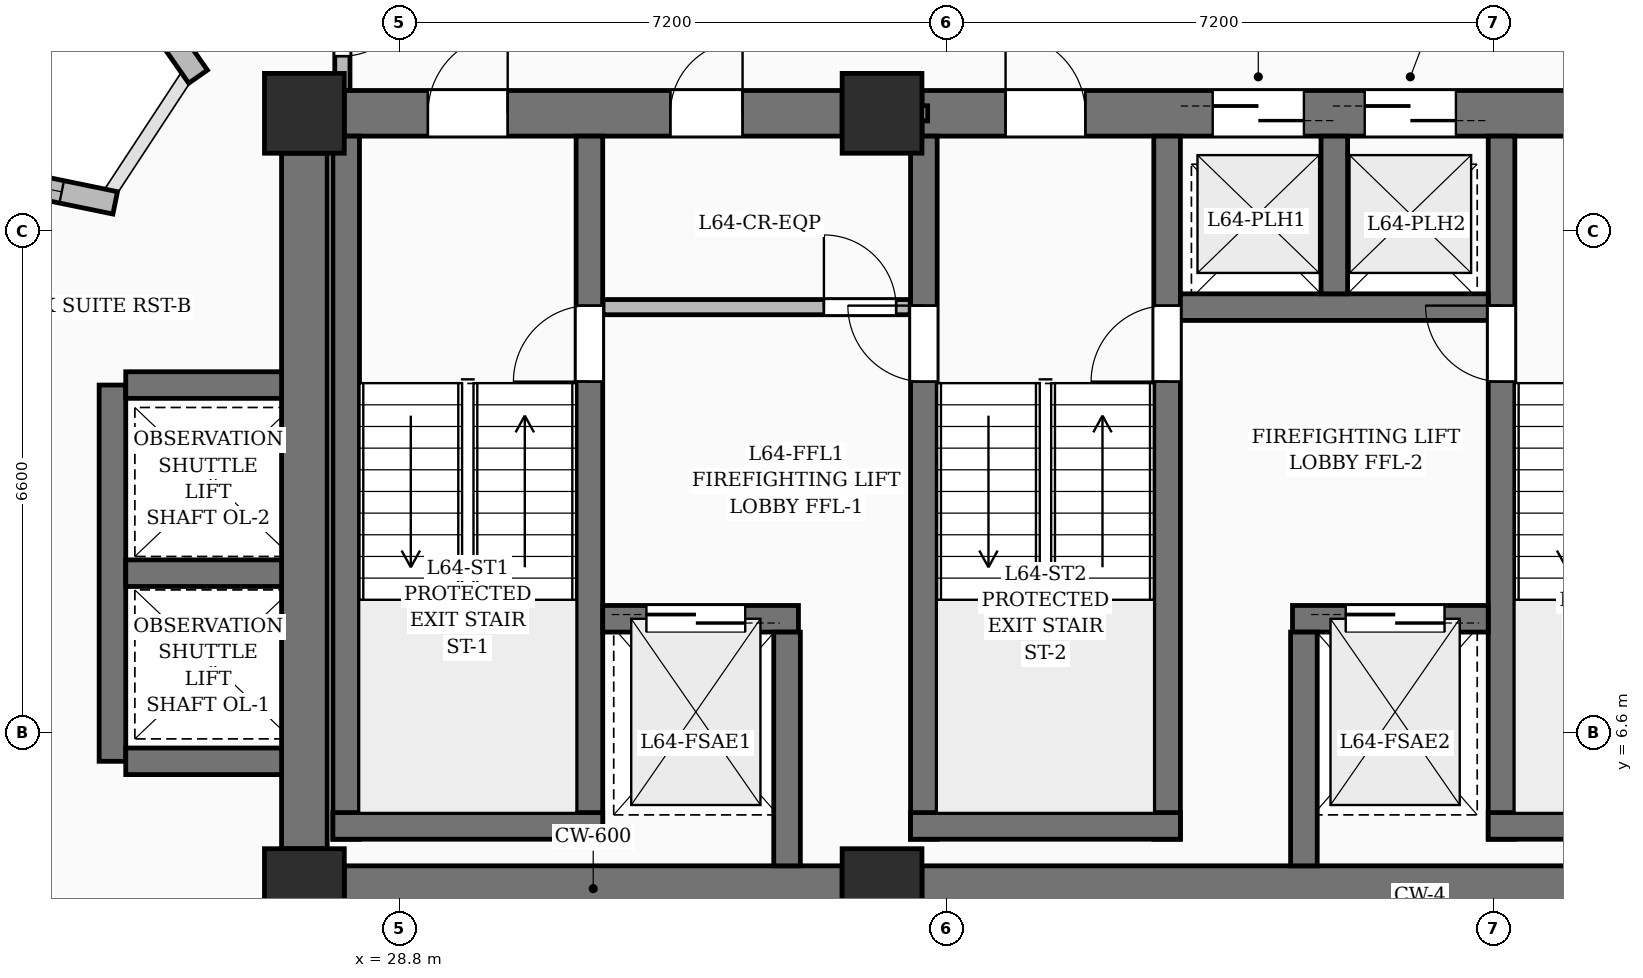
"""IFC4 building model, lengths in metres.
Left out: names, types, materials, properties, quantities, classifications, styles, units other than length and angle.
Written with IfcOpenShell. Run it as: python <this file> out.ifc"""

import sys

from ifc_helpers import new_model, si_unit, direction, frame, frame_2d, origin, origin_2d, place, context, subcontext, project, spatial, rectangle, extrude, element, fill, save


model = new_model("IFC4")
c1 = context("Model", 3, precision=1e-05, world=origin(), true_north=direction((0.0, 1.0)))
c2 = subcontext(c1, "Body", "Model", "MODEL_VIEW")
j1 = project(units=[si_unit("LENGTHUNIT", "METRE"), si_unit("PLANEANGLEUNIT", "RADIAN")], contexts=[c1])
p1 = place(None, origin())
s1 = spatial("IfcSite", under=j1, at=p1, CompositionType="ELEMENT")
p2 = place(p1, origin())
s2 = spatial("IfcBuilding", under=s1, at=p2, CompositionType="ELEMENT")
p3 = place(p2, frame((0.0, 0.0, 248.25)))
s3 = spatial("IfcBuildingStorey", under=s2, at=p3, CompositionType="ELEMENT", Elevation=248.25)
for number, where, z_axis, x_axis in (
    (1, (27.55, 4.55, 0.0), (0.0, 0.0, 1.0), (1.0, 0.0, 0.0)),
    (2, (35.15, 4.55, 0.0), (0.0, 0.0, 1.0), (1.0, 0.0, 0.0)),
    (3, (27.55, 14.75, 0.0), (0.0, 0.0, 1.0), (1.0, 0.0, 0.0)),
    (4, (35.15, 14.75, 0.0), (0.0, 0.0, 1.0), (1.0, 0.0, 0.0)),
):
    element("IfcColumn", number, at=place(p3, frame(where, z_axis=z_axis, x_axis=x_axis)), inside=s3, PredefinedType="COLUMN", context=c2, shape_type="SweptSolid", body=[
        extrude(rectangle(XDim=1.05, YDim=1.05, at=origin_2d()), origin(), (0.0, 0.0, 1.0), 3.75),
    ])
p4 = place(p3, frame((28.075, 4.55, 0.0), z_axis=(0.0, 0.0, 1.0), x_axis=(1.0, 0.0, 0.0)))
e5 = element("IfcWall", 5, at=p4, inside=s3, PredefinedType="SHEAR", context=c2, shape_type="SweptSolid", body=[
    extrude(rectangle(XDim=6.55, YDim=0.6, at=frame_2d((3.275, 0.0))), origin(), (0.0, 0.0, 1.0), 3.75),
])
p5 = place(p3, frame((35.675, 4.55, 0.0), z_axis=(0.0, 0.0, 1.0), x_axis=(1.0, 0.0, 0.0)))
e6 = element("IfcWall", 6, at=p5, inside=s3, PredefinedType="SHEAR", context=c2, shape_type="SweptSolid", body=[
    extrude(rectangle(XDim=10.85, YDim=0.6, at=frame_2d((5.425, 0.0))), origin(), (0.0, 0.0, 1.0), 3.75),
])
p6 = place(p3, frame((28.075, 14.75, 0.0), z_axis=(0.0, 0.0, 1.0), x_axis=(1.0, 0.0, 0.0)))
e7 = element("IfcWall", 7, at=p6, inside=s3, PredefinedType="SHEAR", context=c2, shape_type="SweptSolid", body=[
    extrude(rectangle(XDim=6.55, YDim=0.6, at=frame_2d((3.275, 0.0))), origin(), (0.0, 0.0, 1.0), 3.75),
])
p7 = place(p6, frame((1.1, 0.0, 0.0)))
e8 = element("IfcOpeningElement", 8, at=p7, cuts=e7, PredefinedType="OPENING", context=c2, shape_type="SweptSolid", body=[
    extrude(rectangle(XDim=1.05, YDim=2.15, at=frame_2d((0.525, 1.075))), frame((0.0, 0.31, 0.0), z_axis=(0.0, -1.0, 0.0), x_axis=(1.0, 0.0, 0.0)), (0.0, 0.0, 1.0), 0.62),
])
p8 = place(p6, frame((4.29, 0.0, 0.0)))
e9 = element("IfcOpeningElement", 9, at=p8, cuts=e7, PredefinedType="OPENING", context=c2, shape_type="SweptSolid", body=[
    extrude(rectangle(XDim=0.95, YDim=2.15, at=frame_2d((0.475, 1.075))), frame((0.0, 0.31, 0.0), z_axis=(0.0, -1.0, 0.0), x_axis=(1.0, 0.0, 0.0)), (0.0, 0.0, 1.0), 0.62),
])
p9 = place(p3, frame((35.675, 14.75, 0.0), z_axis=(0.0, 0.0, 1.0), x_axis=(1.0, 0.0, 0.0)))
e10 = element("IfcWall", 10, at=p9, inside=s3, PredefinedType="SHEAR", context=c2, shape_type="SweptSolid", body=[
    extrude(rectangle(XDim=10.85, YDim=0.6, at=frame_2d((5.425, 0.0))), origin(), (0.0, 0.0, 1.0), 3.75),
])
p10 = place(p9, frame((1.1, 0.0, 0.0)))
e11 = element("IfcOpeningElement", 11, at=p10, cuts=e10, PredefinedType="OPENING", context=c2, shape_type="SweptSolid", body=[
    extrude(rectangle(XDim=1.05, YDim=2.15, at=frame_2d((0.525, 1.075))), frame((0.0, 0.31, 0.0), z_axis=(0.0, -1.0, 0.0), x_axis=(1.0, 0.0, 0.0)), (0.0, 0.0, 1.0), 0.62),
])
p11 = place(p9, frame((8.7, 0.0, 0.0)))
e12 = element("IfcOpeningElement", 12, at=p11, cuts=e10, PredefinedType="OPENING", context=c2, shape_type="SweptSolid", body=[
    extrude(rectangle(XDim=1.05, YDim=2.15, at=frame_2d((0.525, 1.075))), frame((0.0, 0.31, 0.0), z_axis=(0.0, -1.0, 0.0), x_axis=(1.0, 0.0, 0.0)), (0.0, 0.0, 1.0), 0.62),
])
p12 = place(p9, frame((3.825, 0.0, 0.0)))
e13 = element("IfcOpeningElement", 13, at=p12, cuts=e10, PredefinedType="OPENING", context=c2, shape_type="SweptSolid", body=[
    extrude(rectangle(XDim=1.2, YDim=2.2, at=frame_2d((0.6, 1.1))), frame((0.0, 0.31, 0.0), z_axis=(0.0, -1.0, 0.0), x_axis=(1.0, 0.0, 0.0)), (0.0, 0.0, 1.0), 0.62),
])
p13 = place(p9, frame((5.825, 0.0, 0.0)))
e14 = element("IfcOpeningElement", 14, at=p13, cuts=e10, PredefinedType="OPENING", context=c2, shape_type="SweptSolid", body=[
    extrude(rectangle(XDim=1.2, YDim=2.2, at=frame_2d((0.6, 1.1))), frame((0.0, 0.31, 0.0), z_axis=(0.0, -1.0, 0.0), x_axis=(1.0, 0.0, 0.0)), (0.0, 0.0, 1.0), 0.62),
])
p14 = place(p3, frame((27.55, 5.075, 0.0), z_axis=(0.0, 0.0, 1.0), x_axis=(0.0, 1.0, 0.0)))
e15 = element("IfcWall", 15, at=p14, inside=s3, PredefinedType="SHEAR", context=c2, shape_type="SweptSolid", body=[
    extrude(rectangle(XDim=9.15, YDim=0.6, at=frame_2d((4.575, 0.0))), origin(), (0.0, 0.0, 1.0), 3.75),
])
p15 = place(p3, frame((28.1, 5.2, 0.0), z_axis=(0.0, 0.0, 1.0), x_axis=(0.0, 1.0, 0.0)))
e16 = element("IfcWall", 16, at=p15, inside=s3, PredefinedType="SOLIDWALL", context=c2, shape_type="SweptSolid", body=[
    extrude(rectangle(XDim=9.25, YDim=0.35, at=frame_2d((4.625, 0.0))), origin(), (0.0, 0.0, 1.0), 3.75),
])
p16 = place(p3, frame((31.3, 5.2, 0.0), z_axis=(0.0, 0.0, 1.0), x_axis=(0.0, 1.0, 0.0)))
e17 = element("IfcWall", 17, at=p16, inside=s3, PredefinedType="SOLIDWALL", context=c2, shape_type="SweptSolid", body=[
    extrude(rectangle(XDim=9.25, YDim=0.35, at=frame_2d((4.625, 0.0))), origin(), (0.0, 0.0, 1.0), 3.75),
])
p17 = place(p16, frame((6.02, 0.0, 0.0)))
e18 = element("IfcOpeningElement", 18, at=p17, cuts=e17, PredefinedType="OPENING", context=c2, shape_type="SweptSolid", body=[
    extrude(rectangle(XDim=1.0, YDim=2.15, at=frame_2d((0.5, 1.075))), frame((0.0, 0.185, 0.0), z_axis=(0.0, -1.0, 0.0), x_axis=(1.0, 0.0, 0.0)), (0.0, 0.0, 1.0), 0.37),
])
p18 = place(p3, frame((27.925, 5.375, 0.0), z_axis=(0.0, 0.0, 1.0), x_axis=(1.0, 0.0, 0.0)))
e19 = element("IfcWall", 19, at=p18, inside=s3, PredefinedType="SOLIDWALL", context=c2, shape_type="SweptSolid", body=[
    extrude(rectangle(XDim=3.55, YDim=0.35, at=frame_2d((1.775, 0.0))), origin(), (0.0, 0.0, 1.0), 3.75),
])
p19 = place(p3, frame((35.7, 5.2, 0.0), z_axis=(0.0, 0.0, 1.0), x_axis=(0.0, 1.0, 0.0)))
e20 = element("IfcWall", 20, at=p19, inside=s3, PredefinedType="SOLIDWALL", context=c2, shape_type="SweptSolid", body=[
    extrude(rectangle(XDim=9.25, YDim=0.35, at=frame_2d((4.625, 0.0))), origin(), (0.0, 0.0, 1.0), 3.75),
])
p20 = place(p19, frame((6.02, 0.0, 0.0)))
e21 = element("IfcOpeningElement", 21, at=p20, cuts=e20, PredefinedType="OPENING", context=c2, shape_type="SweptSolid", body=[
    extrude(rectangle(XDim=1.0, YDim=2.15, at=frame_2d((0.5, 1.075))), frame((0.0, 0.185, 0.0), z_axis=(0.0, -1.0, 0.0), x_axis=(1.0, 0.0, 0.0)), (0.0, 0.0, 1.0), 0.37),
])
p21 = place(p3, frame((38.9, 5.2, 0.0), z_axis=(0.0, 0.0, 1.0), x_axis=(0.0, 1.0, 0.0)))
e22 = element("IfcWall", 22, at=p21, inside=s3, PredefinedType="SOLIDWALL", context=c2, shape_type="SweptSolid", body=[
    extrude(rectangle(XDim=9.25, YDim=0.35, at=frame_2d((4.625, 0.0))), origin(), (0.0, 0.0, 1.0), 3.75),
])
p22 = place(p21, frame((6.02, 0.0, 0.0)))
e23 = element("IfcOpeningElement", 23, at=p22, cuts=e22, PredefinedType="OPENING", context=c2, shape_type="SweptSolid", body=[
    extrude(rectangle(XDim=1.0, YDim=2.15, at=frame_2d((0.5, 1.075))), frame((0.0, 0.185, 0.0), z_axis=(0.0, -1.0, 0.0), x_axis=(1.0, 0.0, 0.0)), (0.0, 0.0, 1.0), 0.37),
])
p23 = place(p3, frame((35.525, 5.375, 0.0), z_axis=(0.0, 0.0, 1.0), x_axis=(1.0, 0.0, 0.0)))
e24 = element("IfcWall", 24, at=p23, inside=s3, PredefinedType="SOLIDWALL", context=c2, shape_type="SweptSolid", body=[
    extrude(rectangle(XDim=3.55, YDim=0.35, at=frame_2d((1.775, 0.0))), origin(), (0.0, 0.0, 1.0), 3.75),
])
p24 = place(p3, frame((43.3, 5.2, 0.0), z_axis=(0.0, 0.0, 1.0), x_axis=(0.0, 1.0, 0.0)))
e25 = element("IfcWall", 25, at=p24, inside=s3, PredefinedType="SOLIDWALL", context=c2, shape_type="SweptSolid", body=[
    extrude(rectangle(XDim=9.25, YDim=0.35, at=frame_2d((4.625, 0.0))), origin(), (0.0, 0.0, 1.0), 3.75),
])
p25 = place(p24, frame((6.02, 0.0, 0.0)))
e26 = element("IfcOpeningElement", 26, at=p25, cuts=e25, PredefinedType="OPENING", context=c2, shape_type="SweptSolid", body=[
    extrude(rectangle(XDim=1.0, YDim=2.15, at=frame_2d((0.5, 1.075))), frame((0.0, 0.185, 0.0), z_axis=(0.0, -1.0, 0.0), x_axis=(1.0, 0.0, 0.0)), (0.0, 0.0, 1.0), 0.37),
])
p26 = place(p3, frame((43.125, 5.375, 0.0), z_axis=(0.0, 0.0, 1.0), x_axis=(1.0, 0.0, 0.0)))
e27 = element("IfcWall", 27, at=p26, inside=s3, PredefinedType="SOLIDWALL", context=c2, shape_type="SweptSolid", body=[
    extrude(rectangle(XDim=3.55, YDim=0.35, at=frame_2d((1.775, 0.0))), origin(), (0.0, 0.0, 1.0), 3.75),
])
p27 = place(p3, frame((31.475, 8.1, 0.0), z_axis=(0.0, 0.0, 1.0), x_axis=(1.0, 0.0, 0.0)))
e28 = element("IfcWall", 28, at=p27, inside=s3, PredefinedType="SOLIDWALL", context=c2, shape_type="SweptSolid", body=[
    extrude(rectangle(XDim=2.575, YDim=0.35, at=frame_2d((1.288, 0.0))), origin(), (0.0, 0.0, 1.0), 3.75),
])
p28 = place(p27, frame((0.575, 0.0, 0.0)))
e29 = element("IfcOpeningElement", 29, at=p28, cuts=e28, PredefinedType="OPENING", context=c2, shape_type="SweptSolid", body=[
    extrude(rectangle(XDim=1.3, YDim=2.25, at=frame_2d((0.65, 1.125))), frame((0.0, 0.185, 0.0), z_axis=(0.0, -1.0, 0.0), x_axis=(1.0, 0.0, 0.0)), (0.0, 0.0, 1.0), 0.37),
])
p29 = place(p3, frame((40.55, 8.1, 0.0), z_axis=(0.0, 0.0, 1.0), x_axis=(1.0, 0.0, 0.0)))
e30 = element("IfcWall", 30, at=p29, inside=s3, PredefinedType="SOLIDWALL", context=c2, shape_type="SweptSolid", body=[
    extrude(rectangle(XDim=2.575, YDim=0.35, at=frame_2d((1.288, 0.0))), origin(), (0.0, 0.0, 1.0), 3.75),
])
p30 = place(p29, frame((0.7, 0.0, 0.0)))
e31 = element("IfcOpeningElement", 31, at=p30, cuts=e30, PredefinedType="OPENING", context=c2, shape_type="SweptSolid", body=[
    extrude(rectangle(XDim=1.3, YDim=2.25, at=frame_2d((0.65, 1.125))), frame((0.0, 0.185, 0.0), z_axis=(0.0, -1.0, 0.0), x_axis=(1.0, 0.0, 0.0)), (0.0, 0.0, 1.0), 0.37),
])
for number, where, z_axis, x_axis in (
    (32, (33.9, 4.85, 0.0), (0.0, 0.0, 1.0), (0.0, 1.0, 0.0)),
    (33, (40.7, 4.85, 0.0), (0.0, 0.0, 1.0), (0.0, 1.0, 0.0)),
):
    element("IfcWall", number, at=place(p3, frame(where, z_axis=z_axis, x_axis=x_axis)), inside=s3, PredefinedType="SOLIDWALL", context=c2, shape_type="SweptSolid", body=[
        extrude(rectangle(XDim=3.075, YDim=0.35, at=frame_2d((1.538, 0.0))), origin(), (0.0, 0.0, 1.0), 3.75),
    ])
p31 = place(p3, frame((39.075, 12.2, 0.0), z_axis=(0.0, 0.0, 1.0), x_axis=(1.0, 0.0, 0.0)))
e34 = element("IfcWall", 34, at=p31, inside=s3, PredefinedType="SOLIDWALL", context=c2, shape_type="SweptSolid", body=[
    extrude(rectangle(XDim=4.05, YDim=0.35, at=frame_2d((2.025, 0.0))), origin(), (0.0, 0.0, 1.0), 3.75),
])
p32 = place(p3, frame((41.1, 12.375, 0.0), z_axis=(0.0, 0.0, 1.0), x_axis=(0.0, 1.0, 0.0)))
e35 = element("IfcWall", 35, at=p32, inside=s3, PredefinedType="SOLIDWALL", context=c2, shape_type="SweptSolid", body=[
    extrude(rectangle(XDim=2.075, YDim=0.35, at=frame_2d((1.038, 0.0))), origin(), (0.0, 0.0, 1.0), 3.75),
])
p33 = place(p3, frame((25.025, 6.225, 0.0), z_axis=(0.0, 0.0, 1.0), x_axis=(0.0, 1.0, 0.0)))
e36 = element("IfcWall", 36, at=p33, inside=s3, PredefinedType="SOLIDWALL", context=c2, shape_type="SweptSolid", body=[
    extrude(rectangle(XDim=4.95, YDim=0.35, at=frame_2d((2.475, 0.0))), origin(), (0.0, 0.0, 1.0), 3.75),
])
for number, where, z_axis, x_axis in (
    (37, (25.2, 6.225, 0.0), (0.0, 0.0, 1.0), (1.0, 0.0, 0.0)),
    (38, (25.2, 8.7, 0.0), (0.0, 0.0, 1.0), (1.0, 0.0, 0.0)),
    (39, (25.2, 11.175, 0.0), (0.0, 0.0, 1.0), (1.0, 0.0, 0.0)),
):
    element("IfcWall", number, at=place(p3, frame(where, z_axis=z_axis, x_axis=x_axis)), inside=s3, PredefinedType="SOLIDWALL", context=c2, shape_type="SweptSolid", body=[
        extrude(rectangle(XDim=2.05, YDim=0.35, at=frame_2d((1.025, 0.0))), origin(), (0.0, 0.0, 1.0), 3.75),
    ])
p34 = place(p3, frame((22.521, 14.094, 0.0), z_axis=(0.0, 0.0, 1.0), x_axis=(0.979494216194, -0.20147228207, 0.0)))
e40 = element("IfcWall", 40, at=p34, inside=s3, PredefinedType="SOLIDWALL", context=c2, shape_type="SweptSolid", body=[
    extrude(rectangle(XDim=2.593, YDim=0.3, at=frame_2d((1.297, 0.0))), origin(), (0.0, 0.0, 1.0), 2.825),
])
p35 = place(p34, frame((0.675, 0.0, 0.8)))
e41 = element("IfcOpeningElement", 41, at=p35, cuts=e40, PredefinedType="OPENING", context=c2, shape_type="SweptSolid", body=[
    extrude(rectangle(XDim=1.2, YDim=1.8, at=frame_2d((0.6, 0.9))), frame((0.0, 0.16, 0.0), z_axis=(0.0, -1.0, 0.0), x_axis=(1.0, 0.0, 0.0)), (0.0, 0.0, 1.0), 0.32),
])
p36 = place(p3, frame((26.151, 15.232, 0.0), z_axis=(0.0, 0.0, 1.0), x_axis=(-0.573607655321, 0.819130183644, 0.0)))
e42 = element("IfcWall", 42, at=p36, inside=s3, PredefinedType="SOLIDWALL", context=c2, shape_type="SweptSolid", body=[
    extrude(rectangle(XDim=2.593, YDim=0.3, at=frame_2d((1.297, 0.0))), origin(), (0.0, 0.0, 1.0), 2.825),
])
p37 = place(p3, frame((34.72, 14.75, 0.0), z_axis=(0.0, 0.0, 1.0), x_axis=(1.0, 0.0, 0.0)))
e43 = element("IfcWall", 43, at=p37, inside=s3, PredefinedType="PARTITIONING", context=c2, shape_type="SweptSolid", body=[
    extrude(rectangle(XDim=1.03, YDim=0.2, at=frame_2d((0.515, 0.0))), origin(), (0.0, 0.0, 1.0), 2.685),
])
p38 = place(p3, frame((31.48, 12.2, 0.0), z_axis=(0.0, 0.0, 1.0), x_axis=(1.0, 0.0, 0.0)))
e44 = element("IfcWall", 44, at=p38, inside=s3, PredefinedType="PARTITIONING", context=c2, shape_type="SweptSolid", body=[
    extrude(rectangle(XDim=4.04, YDim=0.2, at=frame_2d((2.02, 0.0))), origin(), (0.0, 0.0, 1.0), 3.5),
])
p39 = place(p38, frame((2.905, 0.0, 0.0)))
e45 = element("IfcOpeningElement", 45, at=p39, cuts=e44, PredefinedType="OPENING", context=c2, shape_type="SweptSolid", body=[
    extrude(rectangle(XDim=0.95, YDim=2.15, at=frame_2d((0.475, 1.075))), frame((0.0, 0.11, 0.0), z_axis=(0.0, -1.0, 0.0), x_axis=(1.0, 0.0, 0.0)), (0.0, 0.0, 1.0), 0.22),
])
p40 = place(p3, frame((28.05, 16.75, 0.0), z_axis=(0.0, 0.0, 1.0), x_axis=(0.0, -1.0, 0.0)))
e46 = element("IfcWall", 46, at=p40, inside=s3, PredefinedType="PARTITIONING", context=c2, shape_type="SweptSolid", body=[
    extrude(rectangle(XDim=1.7, YDim=0.2, at=frame_2d((0.85, 0.0))), origin(), (0.0, 0.0, 1.0), 3.5),
])
p41 = place(p40, frame((0.348, 0.0, 0.0)))
e47 = element("IfcOpeningElement", 47, at=p41, cuts=e46, PredefinedType="OPENING", context=c2, shape_type="SweptSolid", body=[
    extrude(rectangle(XDim=0.9, YDim=2.1, at=frame_2d((0.45, 1.05))), frame((0.0, 0.11, 0.0), z_axis=(0.0, -1.0, 0.0), x_axis=(1.0, 0.0, 0.0)), (0.0, 0.0, 1.0), 0.22),
])
p42 = place(p35, origin())
e48 = element("IfcWindow", 48, at=p42, inside=s3, PartitioningType="SINGLE_PANEL", PredefinedType="WINDOW", context=c2, shape_type="SweptSolid", body=[
    extrude(rectangle(XDim=1.2, YDim=1.8, at=frame_2d((0.6, 0.9))), frame((0.0, 0.03, 0.0), z_axis=(0.0, -1.0, 0.0), x_axis=(1.0, 0.0, 0.0)), (0.0, 0.0, 1.0), 0.06),
])
fill(e41, e48)
p43 = place(p7, origin())
e49 = element("IfcDoor", 49, at=p43, inside=s3, OperationType="SINGLE_SWING_RIGHT", PredefinedType="DOOR", context=c2, shape_type="SweptSolid", body=[
    extrude(rectangle(XDim=1.05, YDim=2.15, at=frame_2d((0.525, 1.075))), frame((0.0, 0.025, 0.0), z_axis=(0.0, -1.0, 0.0), x_axis=(1.0, 0.0, 0.0)), (0.0, 0.0, 1.0), 0.05),
])
fill(e8, e49)
p44 = place(p10, origin())
e50 = element("IfcDoor", 50, at=p44, inside=s3, OperationType="SINGLE_SWING_LEFT", PredefinedType="DOOR", context=c2, shape_type="SweptSolid", body=[
    extrude(rectangle(XDim=1.05, YDim=2.15, at=frame_2d((0.525, 1.075))), frame((0.0, 0.025, 0.0), z_axis=(0.0, -1.0, 0.0), x_axis=(1.0, 0.0, 0.0)), (0.0, 0.0, 1.0), 0.05),
])
fill(e11, e50)
p45 = place(p17, origin())
e51 = element("IfcDoor", 51, at=p45, inside=s3, OperationType="SINGLE_SWING_LEFT", PredefinedType="DOOR", context=c2, shape_type="SweptSolid", body=[
    extrude(rectangle(XDim=1.0, YDim=2.15, at=frame_2d((0.5, 1.075))), frame((0.0, 0.025, 0.0), z_axis=(0.0, -1.0, 0.0), x_axis=(1.0, 0.0, 0.0)), (0.0, 0.0, 1.0), 0.05),
])
fill(e18, e51)
p46 = place(p20, origin())
e52 = element("IfcDoor", 52, at=p46, inside=s3, OperationType="SINGLE_SWING_RIGHT", PredefinedType="DOOR", context=c2, shape_type="SweptSolid", body=[
    extrude(rectangle(XDim=1.0, YDim=2.15, at=frame_2d((0.5, 1.075))), frame((0.0, 0.025, 0.0), z_axis=(0.0, -1.0, 0.0), x_axis=(1.0, 0.0, 0.0)), (0.0, 0.0, 1.0), 0.05),
])
fill(e21, e52)
p47 = place(p22, origin())
e53 = element("IfcDoor", 53, at=p47, inside=s3, OperationType="SINGLE_SWING_LEFT", PredefinedType="DOOR", context=c2, shape_type="SweptSolid", body=[
    extrude(rectangle(XDim=1.0, YDim=2.15, at=frame_2d((0.5, 1.075))), frame((0.0, 0.025, 0.0), z_axis=(0.0, -1.0, 0.0), x_axis=(1.0, 0.0, 0.0)), (0.0, 0.0, 1.0), 0.05),
])
fill(e23, e53)
p48 = place(p25, origin())
e54 = element("IfcDoor", 54, at=p48, inside=s3, OperationType="SINGLE_SWING_RIGHT", PredefinedType="DOOR", context=c2, shape_type="SweptSolid", body=[
    extrude(rectangle(XDim=1.0, YDim=2.15, at=frame_2d((0.5, 1.075))), frame((0.0, 0.025, 0.0), z_axis=(0.0, -1.0, 0.0), x_axis=(1.0, 0.0, 0.0)), (0.0, 0.0, 1.0), 0.05),
])
fill(e26, e54)
p49 = place(p28, origin())
e55 = element("IfcDoor", 55, at=p49, inside=s3, OperationType="DOUBLE_DOOR_SLIDING", PredefinedType="DOOR", context=c2, shape_type="SweptSolid", body=[
    extrude(rectangle(XDim=1.3, YDim=2.25, at=frame_2d((0.65, 1.125))), frame((0.0, 0.025, 0.0), z_axis=(0.0, -1.0, 0.0), x_axis=(1.0, 0.0, 0.0)), (0.0, 0.0, 1.0), 0.05),
])
fill(e29, e55)
p50 = place(p30, origin())
e56 = element("IfcDoor", 56, at=p50, inside=s3, OperationType="DOUBLE_DOOR_SLIDING", PredefinedType="DOOR", context=c2, shape_type="SweptSolid", body=[
    extrude(rectangle(XDim=1.3, YDim=2.25, at=frame_2d((0.65, 1.125))), frame((0.0, 0.025, 0.0), z_axis=(0.0, -1.0, 0.0), x_axis=(1.0, 0.0, 0.0)), (0.0, 0.0, 1.0), 0.05),
])
fill(e31, e56)
p51 = place(p12, origin())
e57 = element("IfcDoor", 57, at=p51, inside=s3, OperationType="DOUBLE_DOOR_SLIDING", PredefinedType="DOOR", context=c2, shape_type="SweptSolid", body=[
    extrude(rectangle(XDim=1.2, YDim=2.2, at=frame_2d((0.6, 1.1))), frame((0.0, 0.025, 0.0), z_axis=(0.0, -1.0, 0.0), x_axis=(1.0, 0.0, 0.0)), (0.0, 0.0, 1.0), 0.05),
])
fill(e13, e57)
p52 = place(p13, origin())
e58 = element("IfcDoor", 58, at=p52, inside=s3, OperationType="DOUBLE_DOOR_SLIDING", PredefinedType="DOOR", context=c2, shape_type="SweptSolid", body=[
    extrude(rectangle(XDim=1.2, YDim=2.2, at=frame_2d((0.6, 1.1))), frame((0.0, 0.025, 0.0), z_axis=(0.0, -1.0, 0.0), x_axis=(1.0, 0.0, 0.0)), (0.0, 0.0, 1.0), 0.05),
])
fill(e14, e58)
p53 = place(p39, origin())
e59 = element("IfcDoor", 59, at=p53, inside=s3, OperationType="SINGLE_SWING_LEFT", PredefinedType="DOOR", context=c2, shape_type="SweptSolid", body=[
    extrude(rectangle(XDim=0.95, YDim=2.15, at=frame_2d((0.475, 1.075))), frame((0.0, 0.025, 0.0), z_axis=(0.0, -1.0, 0.0), x_axis=(1.0, 0.0, 0.0)), (0.0, 0.0, 1.0), 0.05),
])
fill(e45, e59)
p54 = place(p8, origin())
e60 = element("IfcDoor", 60, at=p54, inside=s3, OperationType="SINGLE_SWING_RIGHT", PredefinedType="DOOR", context=c2, shape_type="SweptSolid", body=[
    extrude(rectangle(XDim=0.95, YDim=2.15, at=frame_2d((0.475, 1.075))), frame((0.0, 0.025, 0.0), z_axis=(0.0, -1.0, 0.0), x_axis=(1.0, 0.0, 0.0)), (0.0, 0.0, 1.0), 0.05),
])
fill(e9, e60)
p55 = place(p41, origin())
e61 = element("IfcDoor", 61, at=p55, inside=s3, OperationType="SINGLE_SWING_LEFT", PredefinedType="DOOR", context=c2, shape_type="SweptSolid", body=[
    extrude(rectangle(XDim=0.9, YDim=2.1, at=frame_2d((0.45, 1.05))), frame((0.0, 0.025, 0.0), z_axis=(0.0, -1.0, 0.0), x_axis=(1.0, 0.0, 0.0)), (0.0, 0.0, 1.0), 0.05),
])
fill(e47, e61)
save(model, sys.argv[1])
